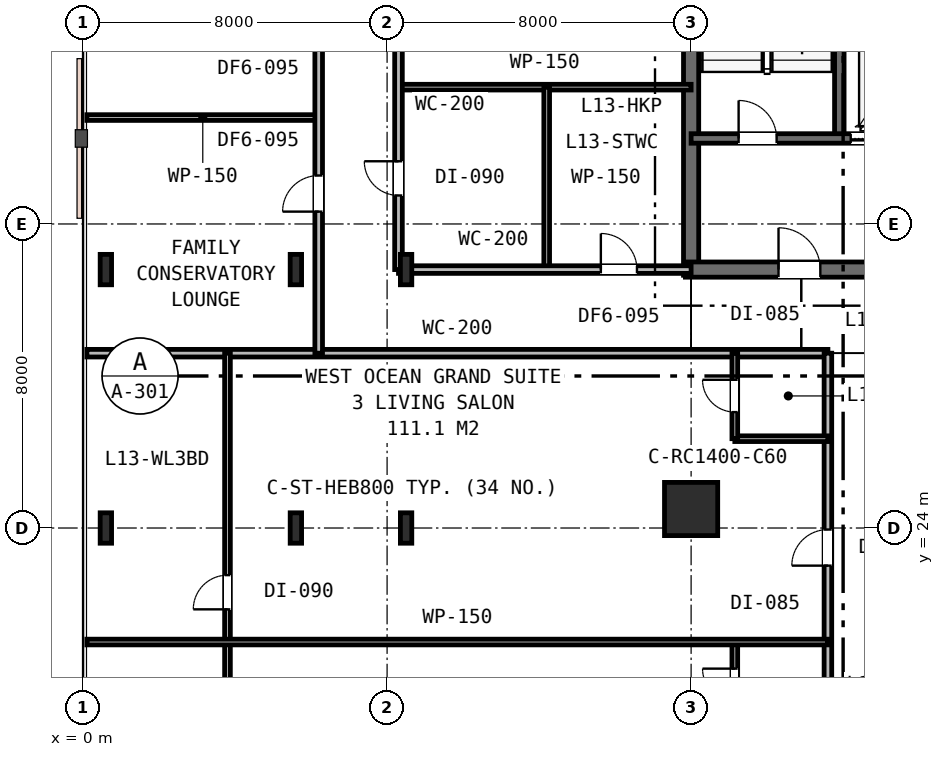
"""IFC4 building model, lengths in metres.
Left out: names, types, materials, properties, quantities, classifications, styles, units other than length and angle.
Written with IfcOpenShell. Run it as: python <this file> out.ifc"""

import sys

from ifc_helpers import new_model, si_unit, direction, frame, frame_2d, origin, origin_2d, place, context, subcontext, project, spatial, rectangle, i_section, extrude, element, fill, save


model = new_model("IFC4")
c1 = context("Model", 3, precision=1e-05, world=origin(), true_north=direction((0.0, 1.0)))
c2 = subcontext(c1, "Body", "Model", "MODEL_VIEW")
j1 = project(units=[si_unit("LENGTHUNIT", "METRE"), si_unit("PLANEANGLEUNIT", "RADIAN")], contexts=[c1])
p1 = place(None, origin())
s1 = spatial("IfcSite", under=j1, at=p1, CompositionType="ELEMENT")
p2 = place(p1, origin())
s2 = spatial("IfcBuilding", under=s1, at=p2, CompositionType="ELEMENT")
p3 = place(p2, frame((0.0, 0.0, 54.6)))
s3 = spatial("IfcBuildingStorey", under=s2, at=p3, CompositionType="ELEMENT", Elevation=54.6)
p4 = place(p3, frame((16.0, 30.65, 0.0), z_axis=(0.0, 0.0, 1.0), x_axis=(0.0, 1.0, 0.0)))
e1 = element("IfcWall", 1, at=p4, inside=s3, PredefinedType="SHEAR", context=c2, shape_type="SweptSolid", body=[
    extrude(rectangle(XDim=12.3, YDim=0.4, at=frame_2d((6.15, 0.0))), origin(), (0.0, 0.0, 1.0), 3.6),
])
p5 = place(p3, frame((15.85, 30.8, 0.0), z_axis=(0.0, 0.0, 1.0), x_axis=(1.0, 0.0, 0.0)))
e2 = element("IfcWall", 2, at=p5, inside=s3, PredefinedType="SHEAR", context=c2, shape_type="SweptSolid", body=[
    extrude(rectangle(XDim=11.2, YDim=0.4, at=frame_2d((5.6, 0.0))), origin(), (0.0, 0.0, 1.0), 3.6),
])
p6 = place(p5, frame((2.45, 0.0, 0.0)))
e3 = element("IfcOpeningElement", 3, at=p6, cuts=e2, PredefinedType="OPENING", context=c2, shape_type="SweptSolid", body=[
    extrude(rectangle(XDim=1.1, YDim=2.15, at=frame_2d((0.55, 1.075))), frame((0.0, 0.21, 0.0), z_axis=(0.0, -1.0, 0.0), x_axis=(1.0, 0.0, 0.0)), (0.0, 0.0, 1.0), 0.42),
])
p7 = place(p3, frame((19.9, 34.25, 0.0), z_axis=(0.0, 0.0, 1.0), x_axis=(0.0, 1.0, 0.0)))
e4 = element("IfcWall", 4, at=p7, inside=s3, PredefinedType="SHEAR", context=c2, shape_type="SweptSolid", body=[
    extrude(rectangle(XDim=8.65, YDim=0.25, at=frame_2d((4.325, 0.0))), origin(), (0.0, 0.0, 1.0), 3.6),
])
p8 = place(p3, frame((16.0, 34.25, 0.0), z_axis=(0.0, 0.0, 1.0), x_axis=(1.0, 0.0, 0.0)))
e5 = element("IfcWall", 5, at=p8, inside=s3, PredefinedType="SHEAR", context=c2, shape_type="SweptSolid", body=[
    extrude(rectangle(XDim=6.05, YDim=0.25, at=frame_2d((3.025, 0.0))), origin(), (0.0, 0.0, 1.0), 3.6),
])
p9 = place(p8, frame((1.25, 0.0, 0.0)))
e6 = element("IfcOpeningElement", 6, at=p9, cuts=e5, PredefinedType="OPENING", context=c2, shape_type="SweptSolid", body=[
    extrude(rectangle(XDim=1.0, YDim=2.15, at=frame_2d((0.5, 1.075))), frame((0.0, 0.135, 0.0), z_axis=(0.0, -1.0, 0.0), x_axis=(1.0, 0.0, 0.0)), (0.0, 0.0, 1.0), 0.27),
])
p10 = place(p8, frame((4.2, 0.0, 0.0)))
e7 = element("IfcOpeningElement", 7, at=p10, cuts=e5, PredefinedType="OPENING", context=c2, shape_type="SweptSolid", body=[
    extrude(rectangle(XDim=1.1, YDim=2.15, at=frame_2d((0.55, 1.075))), frame((0.0, 0.135, 0.0), z_axis=(0.0, -1.0, 0.0), x_axis=(1.0, 0.0, 0.0)), (0.0, 0.0, 1.0), 0.27),
])
p11 = place(p3, frame((8.5, 24.0, 0.0), z_axis=(0.0, 0.0, 1.0), x_axis=(1.0, 0.0, 0.0)))
e8 = element("IfcColumn", 8, at=p11, inside=s3, PredefinedType="COLUMN", context=c2, shape_type="SweptSolid", body=[
    extrude(i_section(OverallWidth=0.3, OverallDepth=0.8, WebThickness=0.018, FlangeThickness=0.033, FilletRadius=0.03, at=origin_2d()), origin(), (0.0, 0.0, 1.0), 3.6),
])
p12 = place(p3, frame((16.0, 24.5, 0.0), z_axis=(0.0, 0.0, 1.0), x_axis=(1.0, 0.0, 0.0)))
e9 = element("IfcColumn", 9, at=p12, inside=s3, PredefinedType="COLUMN", context=c2, shape_type="SweptSolid", body=[
    extrude(rectangle(XDim=1.4, YDim=1.4, at=origin_2d()), origin(), (0.0, 0.0, 1.0), 3.6),
])
for number, where, z_axis, x_axis in (
    (10, (5.6, 24.0, 0.0), (0.0, 0.0, 1.0), (1.0, 0.0, 0.0)),
    (11, (5.6, 30.8, 0.0), (0.0, 0.0, 1.0), (1.0, 0.0, 0.0)),
    (12, (8.5, 30.8, 0.0), (0.0, 0.0, 1.0), (1.0, 0.0, 0.0)),
    (13, (0.6, 24.0, 0.0), (0.0, 0.0, 1.0), (1.0, 0.0, 0.0)),
    (14, (0.6, 30.8, 0.0), (0.0, 0.0, 1.0), (1.0, 0.0, 0.0)),
):
    element("IfcColumn", number, at=place(p3, frame(where, z_axis=z_axis, x_axis=x_axis)), inside=s3, PredefinedType="COLUMN", context=c2, shape_type="SweptSolid", body=[
        extrude(i_section(OverallWidth=0.3, OverallDepth=0.8, WebThickness=0.018, FlangeThickness=0.033, FilletRadius=0.03, at=origin_2d()), origin(), (0.0, 0.0, 1.0), 3.6),
    ])
p13 = place(p3, frame((0.1, 28.6, 0.0), z_axis=(0.0, 0.0, 1.0), x_axis=(1.0, 0.0, 0.0)))
e15 = element("IfcWall", 15, at=p13, inside=s3, PredefinedType="PARTITIONING", context=c2, shape_type="SweptSolid", body=[
    extrude(rectangle(XDim=19.5, YDim=0.2, at=frame_2d((9.75, 0.0))), origin(), (0.0, 0.0, 1.0), 2.82),
])
p14 = place(p3, frame((8.3, 35.6, 0.0), z_axis=(0.0, 0.0, 1.0), x_axis=(1.0, 0.0, 0.0)))
e16 = element("IfcWall", 16, at=p14, inside=s3, PredefinedType="PARTITIONING", context=c2, shape_type="SweptSolid", body=[
    extrude(rectangle(XDim=7.7, YDim=0.15, at=frame_2d((3.85, 0.0))), origin(), (0.0, 0.0, 1.0), 2.82),
])
p15 = place(p3, frame((12.2, 30.8, 0.0), z_axis=(0.0, 0.0, 1.0), x_axis=(0.0, 1.0, 0.0)))
e17 = element("IfcWall", 17, at=p15, inside=s3, PredefinedType="PARTITIONING", context=c2, shape_type="SweptSolid", body=[
    extrude(rectangle(XDim=4.8, YDim=0.15, at=frame_2d((2.4, 0.0))), origin(), (0.0, 0.0, 1.0), 2.82),
])
p16 = place(p3, frame((8.3, 30.8, 0.0), z_axis=(0.0, 0.0, 1.0), x_axis=(1.0, 0.0, 0.0)))
e18 = element("IfcWall", 18, at=p16, inside=s3, PredefinedType="PARTITIONING", context=c2, shape_type="SweptSolid", body=[
    extrude(rectangle(XDim=7.7, YDim=0.2, at=frame_2d((3.85, 0.0))), origin(), (0.0, 0.0, 1.0), 2.82),
])
p17 = place(p16, frame((5.325, 0.0, 0.0)))
e19 = element("IfcOpeningElement", 19, at=p17, cuts=e18, PredefinedType="OPENING", context=c2, shape_type="SweptSolid", body=[
    extrude(rectangle(XDim=0.95, YDim=2.15, at=frame_2d((0.475, 1.075))), frame((0.0, 0.11, 0.0), z_axis=(0.0, -1.0, 0.0), x_axis=(1.0, 0.0, 0.0)), (0.0, 0.0, 1.0), 0.22),
])
p18 = place(p3, frame((8.3, 30.8, 0.0), z_axis=(0.0, 0.0, 1.0), x_axis=(0.0, 1.0, 0.0)))
e20 = element("IfcWall", 20, at=p18, inside=s3, PredefinedType="PARTITIONING", context=c2, shape_type="SweptSolid", body=[
    extrude(rectangle(XDim=10.2, YDim=0.2, at=frame_2d((5.1, 0.0))), origin(), (0.0, 0.0, 1.0), 2.82),
])
p19 = place(p18, frame((1.95, 0.0, 0.0)))
e21 = element("IfcOpeningElement", 21, at=p19, cuts=e20, PredefinedType="OPENING", context=c2, shape_type="SweptSolid", body=[
    extrude(rectangle(XDim=0.9, YDim=2.15, at=frame_2d((0.45, 1.075))), frame((0.0, 0.11, 0.0), z_axis=(0.0, -1.0, 0.0), x_axis=(1.0, 0.0, 0.0)), (0.0, 0.0, 1.0), 0.22),
])
p20 = place(p18, frame((5.861, 0.0, 0.0)))
e22 = element("IfcOpeningElement", 22, at=p20, cuts=e20, PredefinedType="OPENING", context=c2, shape_type="SweptSolid", body=[
    extrude(rectangle(XDim=0.95, YDim=2.15, at=frame_2d((0.475, 1.075))), frame((0.0, 0.11, 0.0), z_axis=(0.0, -1.0, 0.0), x_axis=(1.0, 0.0, 0.0)), (0.0, 0.0, 1.0), 0.22),
])
p21 = place(p3, frame((0.1, 34.8, 0.0), z_axis=(0.0, 0.0, 1.0), x_axis=(1.0, 0.0, 0.0)))
e23 = element("IfcWall", 23, at=p21, inside=s3, PredefinedType="PARTITIONING", context=c2, shape_type="SweptSolid", body=[
    extrude(rectangle(XDim=6.1, YDim=0.15, at=frame_2d((3.05, 0.0))), origin(), (0.0, 0.0, 1.0), 2.82),
])
p22 = place(p3, frame((6.2, 28.6, 0.0), z_axis=(0.0, 0.0, 1.0), x_axis=(0.0, 1.0, 0.0)))
e24 = element("IfcWall", 24, at=p22, inside=s3, PredefinedType="PARTITIONING", context=c2, shape_type="SweptSolid", body=[
    extrude(rectangle(XDim=12.4, YDim=0.2, at=frame_2d((6.2, 0.0))), origin(), (0.0, 0.0, 1.0), 2.82),
])
p23 = place(p22, frame((3.725, 0.0, 0.0)))
e25 = element("IfcOpeningElement", 25, at=p23, cuts=e24, PredefinedType="OPENING", context=c2, shape_type="SweptSolid", body=[
    extrude(rectangle(XDim=0.95, YDim=2.15, at=frame_2d((0.475, 1.075))), frame((0.0, 0.11, 0.0), z_axis=(0.0, -1.0, 0.0), x_axis=(1.0, 0.0, 0.0)), (0.0, 0.0, 1.0), 0.22),
])
p24 = place(p22, frame((8.381, 0.0, 0.0)))
e26 = element("IfcOpeningElement", 26, at=p24, cuts=e24, PredefinedType="OPENING", context=c2, shape_type="SweptSolid", body=[
    extrude(rectangle(XDim=0.95, YDim=2.15, at=frame_2d((0.475, 1.075))), frame((0.0, 0.11, 0.0), z_axis=(0.0, -1.0, 0.0), x_axis=(1.0, 0.0, 0.0)), (0.0, 0.0, 1.0), 0.22),
])
p25 = place(p3, frame((19.6, 5.6, 0.0), z_axis=(0.0, 0.0, 1.0), x_axis=(0.0, 1.0, 0.0)))
e27 = element("IfcWall", 27, at=p25, inside=s3, PredefinedType="PARTITIONING", context=c2, shape_type="SweptSolid", body=[
    extrude(rectangle(XDim=23.0, YDim=0.2, at=frame_2d((11.5, 0.0))), origin(), (0.0, 0.0, 1.0), 2.82),
])
p26 = place(p25, frame((2.19, 0.0, 0.0)))
e28 = element("IfcOpeningElement", 28, at=p26, cuts=e27, PredefinedType="OPENING", context=c2, shape_type="SweptSolid", body=[
    extrude(rectangle(XDim=0.95, YDim=2.15, at=frame_2d((0.475, 1.075))), frame((0.0, 0.11, 0.0), z_axis=(0.0, -1.0, 0.0), x_axis=(1.0, 0.0, 0.0)), (0.0, 0.0, 1.0), 0.22),
])
p27 = place(p25, frame((9.92, 0.0, 0.0)))
e29 = element("IfcOpeningElement", 29, at=p27, cuts=e27, PredefinedType="OPENING", context=c2, shape_type="SweptSolid", body=[
    extrude(rectangle(XDim=0.95, YDim=2.15, at=frame_2d((0.475, 1.075))), frame((0.0, 0.11, 0.0), z_axis=(0.0, -1.0, 0.0), x_axis=(1.0, 0.0, 0.0)), (0.0, 0.0, 1.0), 0.22),
])
p28 = place(p25, frame((17.41, 0.0, 0.0)))
e30 = element("IfcOpeningElement", 30, at=p28, cuts=e27, PredefinedType="OPENING", context=c2, shape_type="SweptSolid", body=[
    extrude(rectangle(XDim=0.95, YDim=2.15, at=frame_2d((0.475, 1.075))), frame((0.0, 0.11, 0.0), z_axis=(0.0, -1.0, 0.0), x_axis=(1.0, 0.0, 0.0)), (0.0, 0.0, 1.0), 0.22),
])
p29 = place(p3, frame((3.8, 5.6, 0.0), z_axis=(0.0, 0.0, 1.0), x_axis=(0.0, 1.0, 0.0)))
e31 = element("IfcWall", 31, at=p29, inside=s3, PredefinedType="PARTITIONING", context=c2, shape_type="SweptSolid", body=[
    extrude(rectangle(XDim=23.0, YDim=0.15, at=frame_2d((11.5, 0.0))), origin(), (0.0, 0.0, 1.0), 2.82),
])
p30 = place(p29, frame((2.575, 0.0, 0.0)))
e32 = element("IfcOpeningElement", 32, at=p30, cuts=e31, PredefinedType="OPENING", context=c2, shape_type="SweptSolid", body=[
    extrude(rectangle(XDim=0.9, YDim=2.15, at=frame_2d((0.45, 1.075))), frame((0.0, 0.085, 0.0), z_axis=(0.0, -1.0, 0.0), x_axis=(1.0, 0.0, 0.0)), (0.0, 0.0, 1.0), 0.17),
])
p31 = place(p29, frame((10.365, 0.0, 0.0)))
e33 = element("IfcOpeningElement", 33, at=p31, cuts=e31, PredefinedType="OPENING", context=c2, shape_type="SweptSolid", body=[
    extrude(rectangle(XDim=0.9, YDim=2.15, at=frame_2d((0.45, 1.075))), frame((0.0, 0.085, 0.0), z_axis=(0.0, -1.0, 0.0), x_axis=(1.0, 0.0, 0.0)), (0.0, 0.0, 1.0), 0.17),
])
p32 = place(p29, frame((16.26, 0.0, 0.0)))
e34 = element("IfcOpeningElement", 34, at=p32, cuts=e31, PredefinedType="OPENING", context=c2, shape_type="SweptSolid", body=[
    extrude(rectangle(XDim=0.9, YDim=2.15, at=frame_2d((0.45, 1.075))), frame((0.0, 0.085, 0.0), z_axis=(0.0, -1.0, 0.0), x_axis=(1.0, 0.0, 0.0)), (0.0, 0.0, 1.0), 0.17),
])
p33 = place(p3, frame((17.15, 18.75, 0.0), z_axis=(0.0, 0.0, 1.0), x_axis=(0.0, 1.0, 0.0)))
e35 = element("IfcWall", 35, at=p33, inside=s3, PredefinedType="PARTITIONING", context=c2, shape_type="SweptSolid", body=[
    extrude(rectangle(XDim=2.25, YDim=0.15, at=frame_2d((1.125, 0.0))), origin(), (0.0, 0.0, 1.0), 3.33),
])
p34 = place(p33, frame((0.7, 0.0, 0.0)))
e36 = element("IfcOpeningElement", 36, at=p34, cuts=e35, PredefinedType="OPENING", context=c2, shape_type="SweptSolid", body=[
    extrude(rectangle(XDim=0.85, YDim=2.15, at=frame_2d((0.425, 1.075))), frame((0.0, 0.085, 0.0), z_axis=(0.0, -1.0, 0.0), x_axis=(1.0, 0.0, 0.0)), (0.0, 0.0, 1.0), 0.17),
])
p35 = place(p3, frame((0.1, 21.0, 0.0), z_axis=(0.0, 0.0, 1.0), x_axis=(1.0, 0.0, 0.0)))
e37 = element("IfcWall", 37, at=p35, inside=s3, PredefinedType="PARTITIONING", context=c2, shape_type="SweptSolid", body=[
    extrude(rectangle(XDim=19.5, YDim=0.15, at=frame_2d((9.75, 0.0))), origin(), (0.0, 0.0, 1.0), 2.82),
])
p36 = place(p3, frame((17.15, 26.35, 0.0), z_axis=(0.0, 0.0, 1.0), x_axis=(1.0, 0.0, 0.0)))
e38 = element("IfcWall", 38, at=p36, inside=s3, PredefinedType="PARTITIONING", context=c2, shape_type="SweptSolid", body=[
    extrude(rectangle(XDim=2.45, YDim=0.15, at=frame_2d((1.225, 0.0))), origin(), (0.0, 0.0, 1.0), 2.96),
])
p37 = place(p3, frame((17.15, 26.35, 0.0), z_axis=(0.0, 0.0, 1.0), x_axis=(0.0, 1.0, 0.0)))
e39 = element("IfcWall", 39, at=p37, inside=s3, PredefinedType="PARTITIONING", context=c2, shape_type="SweptSolid", body=[
    extrude(rectangle(XDim=2.25, YDim=0.15, at=frame_2d((1.125, 0.0))), origin(), (0.0, 0.0, 1.0), 3.33),
])
p38 = place(p37, frame((0.7, 0.0, 0.0)))
e40 = element("IfcOpeningElement", 40, at=p38, cuts=e39, PredefinedType="OPENING", context=c2, shape_type="SweptSolid", body=[
    extrude(rectangle(XDim=0.85, YDim=2.15, at=frame_2d((0.425, 1.075))), frame((0.0, 0.085, 0.0), z_axis=(0.0, -1.0, 0.0), x_axis=(1.0, 0.0, 0.0)), (0.0, 0.0, 1.0), 0.17),
])
p39 = place(p9, origin())
e41 = element("IfcDoor", 41, at=p39, inside=s3, OperationType="SINGLE_SWING_LEFT", PredefinedType="DOOR", context=c2, shape_type="SweptSolid", body=[
    extrude(rectangle(XDim=1.0, YDim=2.15, at=frame_2d((0.5, 1.075))), frame((0.0, 0.025, 0.0), z_axis=(0.0, -1.0, 0.0), x_axis=(1.0, 0.0, 0.0)), (0.0, 0.0, 1.0), 0.05),
])
fill(e6, e41)
p40 = place(p6, origin())
e42 = element("IfcDoor", 42, at=p40, inside=s3, OperationType="SINGLE_SWING_LEFT", PredefinedType="DOOR", context=c2, shape_type="SweptSolid", body=[
    extrude(rectangle(XDim=1.1, YDim=2.15, at=frame_2d((0.55, 1.075))), frame((0.0, 0.025, 0.0), z_axis=(0.0, -1.0, 0.0), x_axis=(1.0, 0.0, 0.0)), (0.0, 0.0, 1.0), 0.05),
])
fill(e3, e42)
p41 = place(p17, origin())
e43 = element("IfcDoor", 43, at=p41, inside=s3, OperationType="SINGLE_SWING_LEFT", PredefinedType="DOOR", context=c2, shape_type="SweptSolid", body=[
    extrude(rectangle(XDim=0.95, YDim=2.15, at=frame_2d((0.475, 1.075))), frame((0.0, 0.025, 0.0), z_axis=(0.0, -1.0, 0.0), x_axis=(1.0, 0.0, 0.0)), (0.0, 0.0, 1.0), 0.05),
])
fill(e19, e43)
p42 = place(p19, origin())
e44 = element("IfcDoor", 44, at=p42, inside=s3, OperationType="SINGLE_SWING_RIGHT", PredefinedType="DOOR", context=c2, shape_type="SweptSolid", body=[
    extrude(rectangle(XDim=0.9, YDim=2.15, at=frame_2d((0.45, 1.075))), frame((0.0, 0.025, 0.0), z_axis=(0.0, -1.0, 0.0), x_axis=(1.0, 0.0, 0.0)), (0.0, 0.0, 1.0), 0.05),
])
fill(e21, e44)
p43 = place(p23, origin())
e45 = element("IfcDoor", 45, at=p43, inside=s3, OperationType="SINGLE_SWING_LEFT", PredefinedType="DOOR", context=c2, shape_type="SweptSolid", body=[
    extrude(rectangle(XDim=0.95, YDim=2.15, at=frame_2d((0.475, 1.075))), frame((0.0, 0.025, 0.0), z_axis=(0.0, -1.0, 0.0), x_axis=(1.0, 0.0, 0.0)), (0.0, 0.0, 1.0), 0.05),
])
fill(e25, e45)
p44 = place(p34, origin())
e46 = element("IfcDoor", 46, at=p44, inside=s3, OperationType="SINGLE_SWING_RIGHT", PredefinedType="DOOR", context=c2, shape_type="SweptSolid", body=[
    extrude(rectangle(XDim=0.85, YDim=2.15, at=frame_2d((0.425, 1.075))), frame((0.0, 0.025, 0.0), z_axis=(0.0, -1.0, 0.0), x_axis=(1.0, 0.0, 0.0)), (0.0, 0.0, 1.0), 0.05),
])
fill(e36, e46)
p45 = place(p28, origin())
e47 = element("IfcDoor", 47, at=p45, inside=s3, OperationType="SINGLE_SWING_LEFT", PredefinedType="DOOR", context=c2, shape_type="SweptSolid", body=[
    extrude(rectangle(XDim=0.95, YDim=2.15, at=frame_2d((0.475, 1.075))), frame((0.0, 0.025, 0.0), z_axis=(0.0, -1.0, 0.0), x_axis=(1.0, 0.0, 0.0)), (0.0, 0.0, 1.0), 0.05),
])
fill(e30, e47)
p46 = place(p38, origin())
e48 = element("IfcDoor", 48, at=p46, inside=s3, OperationType="SINGLE_SWING_RIGHT", PredefinedType="DOOR", context=c2, shape_type="SweptSolid", body=[
    extrude(rectangle(XDim=0.85, YDim=2.15, at=frame_2d((0.425, 1.075))), frame((0.0, 0.025, 0.0), z_axis=(0.0, -1.0, 0.0), x_axis=(1.0, 0.0, 0.0)), (0.0, 0.0, 1.0), 0.05),
])
fill(e40, e48)
p47 = place(p32, origin())
e49 = element("IfcDoor", 49, at=p47, inside=s3, OperationType="SINGLE_SWING_LEFT", PredefinedType="DOOR", context=c2, shape_type="SweptSolid", body=[
    extrude(rectangle(XDim=0.9, YDim=2.15, at=frame_2d((0.45, 1.075))), frame((0.0, 0.025, 0.0), z_axis=(0.0, -1.0, 0.0), x_axis=(1.0, 0.0, 0.0)), (0.0, 0.0, 1.0), 0.05),
])
fill(e34, e49)
p48 = place(p10, origin())
e50 = element("IfcDoor", 50, at=p48, inside=s3, OperationType="DOUBLE_DOOR_SLIDING", PredefinedType="DOOR", context=c2, shape_type="SweptSolid", body=[
    extrude(rectangle(XDim=1.1, YDim=2.15, at=frame_2d((0.55, 1.075))), frame((0.0, 0.025, 0.0), z_axis=(0.0, -1.0, 0.0), x_axis=(1.0, 0.0, 0.0)), (0.0, 0.0, 1.0), 0.05),
])
fill(e7, e50)
save(model, sys.argv[1])
